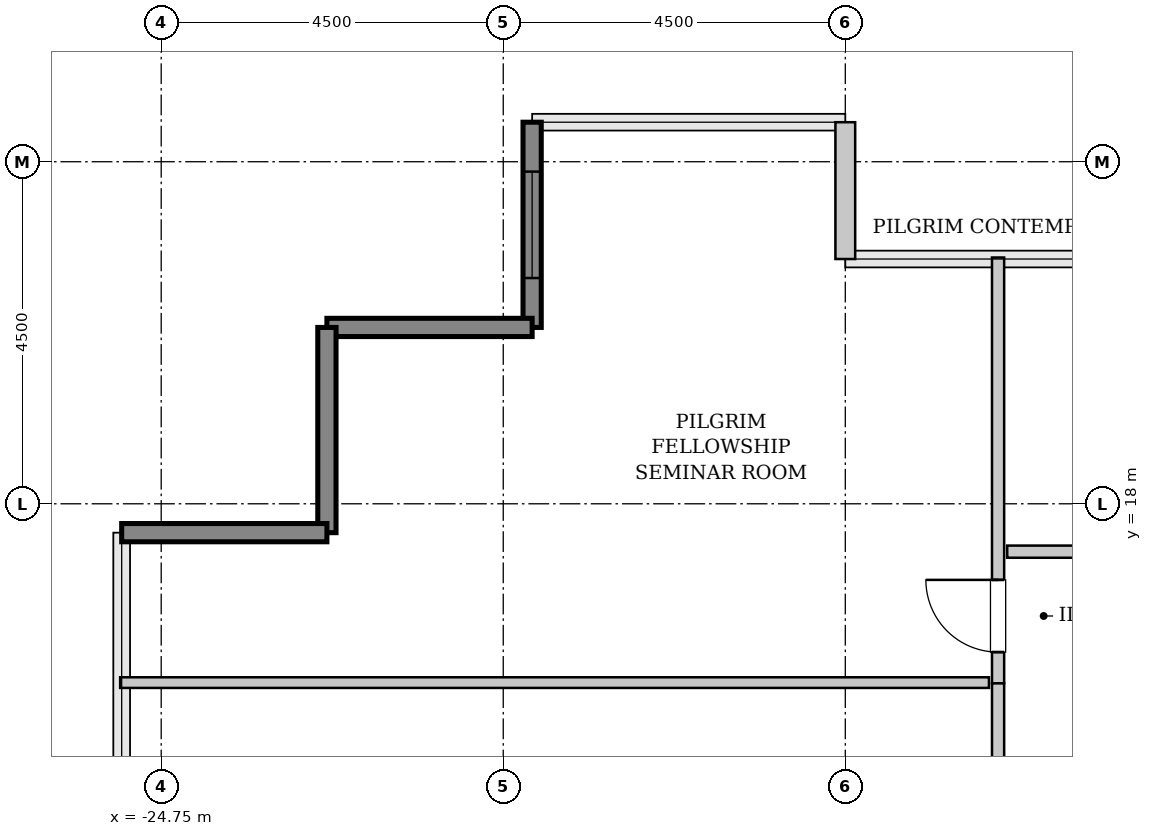
"""IFC4 building model, lengths in metres.
Left out: names, types, materials, properties, quantities, classifications, styles, units other than length and angle.
Written with IfcOpenShell. Run it as: python <this file> out.ifc"""

import sys

from ifc_helpers import new_model, si_unit, direction, frame, frame_2d, origin, place, context, subcontext, project, spatial, rectangle, extrude, source, transform, mapped, element, fill, save


model = new_model("IFC4")
c1 = context("Model", 3, precision=1e-05, world=origin(), true_north=direction((0.0, 1.0)))
c2 = subcontext(c1, "Body", "Model", "MODEL_VIEW")
j1 = project(units=[si_unit("LENGTHUNIT", "METRE"), si_unit("PLANEANGLEUNIT", "RADIAN")], contexts=[c1])
p1 = place(None, origin())
s1 = spatial("IfcSite", under=j1, at=p1, CompositionType="ELEMENT")
p2 = place(p1, origin())
s2 = spatial("IfcBuilding", under=s1, at=p2, CompositionType="ELEMENT")
p3 = place(p2, frame((0.0, 0.0, 210.4)))
s3 = spatial("IfcBuildingStorey", under=s2, at=p3, CompositionType="ELEMENT", Elevation=210.4)
m1 = source(origin(), c2, "Body", "SweptSolid", [
    extrude(rectangle(XDim=1.8, YDim=0.26, at=frame_2d((0.9, 0.0))), origin(), (0.0, 0.0, 1.0), 3.55),
])
p4 = place(p3, frame((-15.75, 21.22, 0.0), z_axis=(0.0, 0.0, 1.0), x_axis=(0.0, 1.0, 0.0)))
e1 = element("IfcWall", 1, at=p4, inside=s3, PredefinedType="SOLIDWALL", context=c2, shape_type="MappedRepresentation", body=[
    mapped(m1, transform((0.0, 0.0, 0.0), x_axis=(1.0, 0.0, 0.0), y_axis=(0.0, 1.0, 0.0), z_axis=(0.0, 0.0, 1.0), scale=1.0)),
])
m2 = source(origin(), c2, "Body", "SweptSolid", [
    extrude(rectangle(XDim=2.7, YDim=0.24, at=frame_2d((1.35, 0.0))), origin(), (0.0, 0.0, 1.0), 3.55),
])
p5 = place(p3, frame((-19.87, 23.02, 0.0), z_axis=(0.0, 0.0, 1.0), x_axis=(0.0, -1.0, 0.0)))
e2 = element("IfcWall", 2, at=p5, inside=s3, PredefinedType="SHEAR", context=c2, shape_type="MappedRepresentation", body=[
    mapped(m2, transform((0.0, 0.0, 0.0), x_axis=(1.0, 0.0, 0.0), y_axis=(0.0, 1.0, 0.0), z_axis=(0.0, 0.0, 1.0), scale=1.0)),
])
p6 = place(p5, frame((0.65, 0.0, 0.85)))
e3 = element("IfcOpeningElement", 3, at=p6, cuts=e2, PredefinedType="OPENING", context=c2, shape_type="SweptSolid", body=[
    extrude(rectangle(XDim=1.4, YDim=1.8, at=frame_2d((0.7, 0.9))), frame((0.0, 0.13, 0.0), z_axis=(0.0, -1.0, 0.0), x_axis=(1.0, 0.0, 0.0)), (0.0, 0.0, 1.0), 0.26),
])
for number, where, z_axis, x_axis in (
    (4, (-19.87, 20.32, 0.0), (0.0, 0.0, 1.0), (-1.0, 0.0, 0.0)),
    (5, (-22.57, 20.32, 0.0), (0.0, 0.0, 1.0), (0.0, -1.0, 0.0)),
    (6, (-22.57, 17.62, 0.0), (0.0, 0.0, 1.0), (-1.0, 0.0, 0.0)),
):
    element("IfcWall", number, at=place(p3, frame(where, z_axis=z_axis, x_axis=x_axis)), inside=s3, PredefinedType="SHEAR", context=c2, shape_type="MappedRepresentation", body=[
        mapped(m2, transform((0.0, 0.0, 0.0), x_axis=(1.0, 0.0, 0.0), y_axis=(0.0, 1.0, 0.0), z_axis=(0.0, 0.0, 1.0), scale=1.0)),
    ])
m3 = source(origin(), c2, "Body", "SweptSolid", [
    extrude(rectangle(XDim=5.603, YDim=0.16, at=frame_2d((2.801, 0.0))), origin(), (0.0, 0.0, 1.0), 3.535),
])
p7 = place(p3, frame((-13.74, 15.637, 0.0), z_axis=(0.0, 0.0, 1.0), x_axis=(0.0, 1.0, 0.0)))
e7 = element("IfcWall", 7, at=p7, inside=s3, PredefinedType="PARTITIONING", context=c2, shape_type="MappedRepresentation", body=[
    mapped(m3, transform((0.0, 0.0, 0.0), x_axis=(1.0, 0.0, 0.0), y_axis=(0.0, 1.0, 0.0), z_axis=(0.0, 0.0, 1.0), scale=1.0)),
])
p8 = place(p7, frame((0.411, 0.0, 0.0)))
e8 = element("IfcOpeningElement", 8, at=p8, cuts=e7, PredefinedType="OPENING", context=c2, shape_type="SweptSolid", body=[
    extrude(rectangle(XDim=0.95, YDim=2.1, at=frame_2d((0.475, 1.05))), frame((0.0, 0.09, 0.0), z_axis=(0.0, -1.0, 0.0), x_axis=(1.0, 0.0, 0.0)), (0.0, 0.0, 1.0), 0.18),
])
m4 = source(origin(), c2, "Body", "SweptSolid", [
    extrude(rectangle(XDim=11.43, YDim=0.14, at=frame_2d((5.715, 0.0))), origin(), (0.0, 0.0, 1.0), 3.535),
])
p9 = place(p3, frame((-25.29, 15.647, 0.0), z_axis=(0.0, 0.0, 1.0), x_axis=(1.0, 0.0, 0.0)))
e9 = element("IfcWall", 9, at=p9, inside=s3, PredefinedType="PARTITIONING", context=c2, shape_type="MappedRepresentation", body=[
    mapped(m4, transform((0.0, 0.0, 0.0), x_axis=(1.0, 0.0, 0.0), y_axis=(0.0, 1.0, 0.0), z_axis=(0.0, 0.0, 1.0), scale=1.0)),
])
m5 = source(origin(), c2, "Body", "SweptSolid", [
    extrude(rectangle(XDim=7.343, YDim=0.16, at=frame_2d((3.671, 0.0))), origin(), (0.0, 0.0, 1.0), 3.535),
])
p10 = place(p3, frame((-13.74, 8.295, 0.0), z_axis=(0.0, 0.0, 1.0), x_axis=(0.0, 1.0, 0.0)))
e10 = element("IfcWall", 10, at=p10, inside=s3, PredefinedType="PARTITIONING", context=c2, shape_type="MappedRepresentation", body=[
    mapped(m5, transform((0.0, 0.0, 0.0), x_axis=(1.0, 0.0, 0.0), y_axis=(0.0, 1.0, 0.0), z_axis=(0.0, 0.0, 1.0), scale=1.0)),
])
p11 = place(p10, frame((3.196, 0.0, 0.0)))
e11 = element("IfcOpeningElement", 11, at=p11, cuts=e10, PredefinedType="OPENING", context=c2, shape_type="SweptSolid", body=[
    extrude(rectangle(XDim=0.95, YDim=2.1, at=frame_2d((0.475, 1.05))), frame((0.0, 0.09, 0.0), z_axis=(0.0, -1.0, 0.0), x_axis=(1.0, 0.0, 0.0)), (0.0, 0.0, 1.0), 0.18),
])
m6 = source(origin(), c2, "Body", "SweptSolid", [
    extrude(rectangle(XDim=4.16, YDim=0.16, at=frame_2d((2.08, 0.0))), origin(), (0.0, 0.0, 1.0), 3.535),
])
p12 = place(p3, frame((-13.62, 17.37, 0.0), z_axis=(0.0, 0.0, 1.0), x_axis=(1.0, 0.0, 0.0)))
e12 = element("IfcWall", 12, at=p12, inside=s3, PredefinedType="PARTITIONING", context=c2, shape_type="MappedRepresentation", body=[
    mapped(m6, transform((0.0, 0.0, 0.0), x_axis=(1.0, 0.0, 0.0), y_axis=(0.0, 1.0, 0.0), z_axis=(0.0, 0.0, 1.0), scale=1.0)),
])
p13 = place(p12, frame((0.969, 0.0, 0.0)))
e13 = element("IfcOpeningElement", 13, at=p13, cuts=e12, PredefinedType="OPENING", context=c2, shape_type="SweptSolid", body=[
    extrude(rectangle(XDim=0.95, YDim=2.1, at=frame_2d((0.475, 1.05))), frame((0.0, 0.09, 0.0), z_axis=(0.0, -1.0, 0.0), x_axis=(1.0, 0.0, 0.0)), (0.0, 0.0, 1.0), 0.18),
])
m7 = source(origin(), c2, "Body", "SweptSolid", [
    extrude(rectangle(XDim=1.4, YDim=1.8, at=frame_2d((0.7, 0.9))), frame((0.0, 0.03, 0.0), z_axis=(0.0, -1.0, 0.0), x_axis=(1.0, 0.0, 0.0)), (0.0, 0.0, 1.0), 0.06),
])
p14 = place(p6, origin())
e14 = element("IfcWindow", 14, at=p14, inside=s3, PartitioningType="SINGLE_PANEL", PredefinedType="WINDOW", context=c2, shape_type="MappedRepresentation", body=[
    mapped(m7, transform((0.0, 0.0, 0.0), x_axis=(1.0, 0.0, 0.0), y_axis=(0.0, 1.0, 0.0), z_axis=(0.0, 0.0, 1.0), scale=1.0)),
])
fill(e3, e14)
m8 = source(origin(), c2, "Body", "SweptSolid", [
    extrude(rectangle(XDim=0.95, YDim=2.1, at=frame_2d((0.475, 1.05))), frame((0.0, 0.025, 0.0), z_axis=(0.0, -1.0, 0.0), x_axis=(1.0, 0.0, 0.0)), (0.0, 0.0, 1.0), 0.05),
])
p15 = place(p8, origin())
e15 = element("IfcDoor", 15, at=p15, inside=s3, OperationType="SINGLE_SWING_RIGHT", PredefinedType="DOOR", context=c2, shape_type="MappedRepresentation", body=[
    mapped(m8, transform((0.0, 0.0, 0.0), x_axis=(1.0, 0.0, 0.0), y_axis=(0.0, 1.0, 0.0), z_axis=(0.0, 0.0, 1.0), scale=1.0)),
])
fill(e8, e15)
save(model, sys.argv[1])
